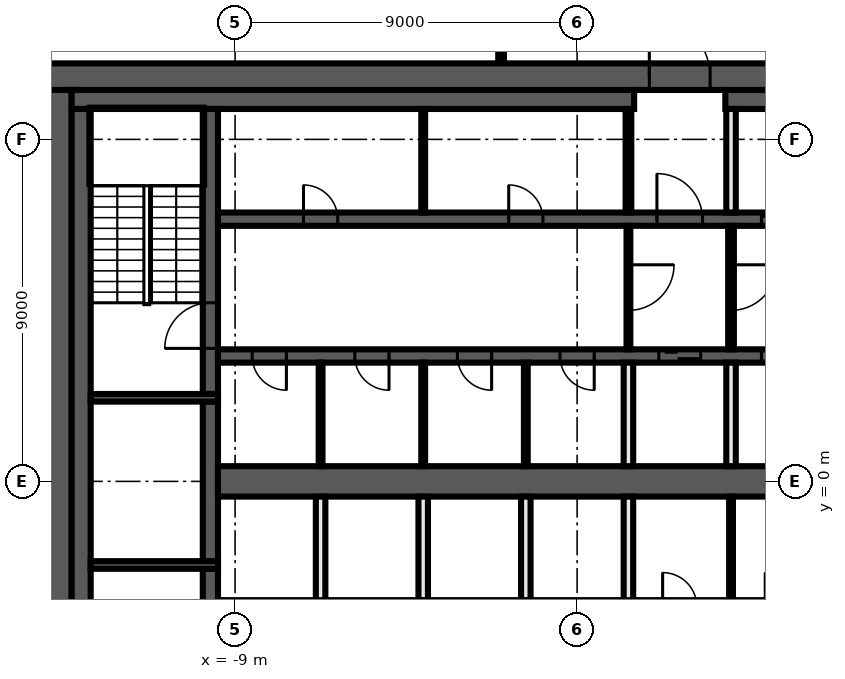
"""IFC4 building model, lengths in metres.
Left out: names, types, materials, properties, quantities, classifications, styles, units other than length and angle.
Written with IfcOpenShell. Run it as: python <this file> out.ifc"""

import sys

from ifc_helpers import new_model, si_unit, direction, frame, frame_2d, origin, place, context, subcontext, project, spatial, rectangle, extrude, element, fill, save


model = new_model("IFC4")
c1 = context("Model", 3, precision=1e-05, world=origin(), true_north=direction((0.0, 1.0)))
c2 = subcontext(c1, "Body", "Model", "MODEL_VIEW")
j1 = project(units=[si_unit("LENGTHUNIT", "METRE"), si_unit("PLANEANGLEUNIT", "RADIAN")], contexts=[c1])
p1 = place(None, origin())
s1 = spatial("IfcSite", under=j1, at=p1, CompositionType="ELEMENT")
p2 = place(p1, origin())
s2 = spatial("IfcBuilding", under=s1, at=p2, CompositionType="ELEMENT")
p3 = place(p2, frame((0.0, 0.0, 237.0)))
s3 = spatial("IfcBuildingStorey", under=s2, at=p3, CompositionType="ELEMENT", Elevation=237.0)
p4 = place(p3, frame((-2.0, 11.0, 0.0), z_axis=(0.0, 0.0, 1.0), x_axis=(0.0, 1.0, 0.0)))
e1 = element("IfcWall", 1, at=p4, inside=s3, PredefinedType="PARTITIONING", context=c2, shape_type="SweptSolid", body=[
    extrude(rectangle(XDim=2.325, YDim=0.15, at=frame_2d((1.163, 0.0))), origin(), (0.0, 0.0, 1.0), 3.82),
])
p5 = place(p3, frame((-14.0, 10.65, 0.0), z_axis=(0.0, 0.0, 1.0), x_axis=(1.0, 0.0, 0.0)))
e2 = element("IfcWall", 2, at=p5, inside=s3, PredefinedType="SHEAR", context=c2, shape_type="SweptSolid", body=[
    extrude(rectangle(XDim=28.0, YDim=0.7, at=frame_2d((14.0, 0.0))), origin(), (0.0, 0.0, 1.0), 3.82),
])
p6 = place(p5, frame((15.9, 0.0, 0.0)))
e3 = element("IfcOpeningElement", 3, at=p6, cuts=e2, PredefinedType="OPENING", context=c2, shape_type="SweptSolid", body=[
    extrude(rectangle(XDim=1.6, YDim=2.1, at=frame_2d((0.8, 1.05))), frame((0.0, 0.36, 0.0), z_axis=(0.0, -1.0, 0.0), x_axis=(1.0, 0.0, 0.0)), (0.0, 0.0, 1.0), 0.72),
])
p7 = place(p3, frame((-13.65, -10.3, 0.0), z_axis=(0.0, 0.0, 1.0), x_axis=(0.0, 1.0, 0.0)))
e4 = element("IfcWall", 4, at=p7, inside=s3, PredefinedType="SHEAR", context=c2, shape_type="SweptSolid", body=[
    extrude(rectangle(XDim=20.6, YDim=0.7, at=frame_2d((10.3, 0.0))), origin(), (0.0, 0.0, 1.0), 3.82),
])
p8 = place(p3, frame((-13.3, 10.05, 0.0), z_axis=(0.0, 0.0, 1.0), x_axis=(1.0, 0.0, 0.0)))
e5 = element("IfcWall", 5, at=p8, inside=s3, PredefinedType="SHEAR", context=c2, shape_type="SweptSolid", body=[
    extrude(rectangle(XDim=14.8, YDim=0.5, at=frame_2d((7.4, 0.0))), origin(), (0.0, 0.0, 1.0), 3.82),
])
p9 = place(p3, frame((3.9, 10.05, 0.0), z_axis=(0.0, 0.0, 1.0), x_axis=(1.0, 0.0, 0.0)))
e6 = element("IfcWall", 6, at=p9, inside=s3, PredefinedType="SHEAR", context=c2, shape_type="SweptSolid", body=[
    extrude(rectangle(XDim=9.4, YDim=0.5, at=frame_2d((4.7, 0.0))), origin(), (0.0, 0.0, 1.0), 3.82),
])
p10 = place(p3, frame((-13.05, -9.8, 0.0), z_axis=(0.0, 0.0, 1.0), x_axis=(0.0, 1.0, 0.0)))
e7 = element("IfcWall", 7, at=p10, inside=s3, PredefinedType="SHEAR", context=c2, shape_type="SweptSolid", body=[
    extrude(rectangle(XDim=19.6, YDim=0.5, at=frame_2d((9.8, 0.0))), origin(), (0.0, 0.0, 1.0), 3.82),
])
p11 = place(p3, frame((-9.65, -9.8, 0.0), z_axis=(0.0, 0.0, 1.0), x_axis=(0.0, 1.0, 0.0)))
e8 = element("IfcWall", 8, at=p11, inside=s3, PredefinedType="SHEAR", context=c2, shape_type="SweptSolid", body=[
    extrude(rectangle(XDim=7.5, YDim=0.4, at=frame_2d((3.75, 0.0))), origin(), (0.0, 0.0, 1.0), 3.82),
])
p12 = place(p11, frame((5.1, 0.0, 0.0)))
e9 = element("IfcOpeningElement", 9, at=p12, cuts=e8, PredefinedType="OPENING", context=c2, shape_type="SweptSolid", body=[
    extrude(rectangle(XDim=1.2, YDim=2.1, at=frame_2d((0.6, 1.05))), frame((0.0, 0.21, 0.0), z_axis=(0.0, -1.0, 0.0), x_axis=(1.0, 0.0, 0.0)), (0.0, 0.0, 1.0), 0.42),
])
p13 = place(p3, frame((-9.65, -2.1, 0.0), z_axis=(0.0, 0.0, 1.0), x_axis=(0.0, 1.0, 0.0)))
e10 = element("IfcWall", 10, at=p13, inside=s3, PredefinedType="SHEAR", context=c2, shape_type="SweptSolid", body=[
    extrude(rectangle(XDim=4.2, YDim=0.4, at=frame_2d((2.1, 0.0))), origin(), (0.0, 0.0, 1.0), 3.82),
])
p14 = place(p3, frame((-9.65, 2.3, 0.0), z_axis=(0.0, 0.0, 1.0), x_axis=(0.0, 1.0, 0.0)))
e11 = element("IfcWall", 11, at=p14, inside=s3, PredefinedType="SHEAR", context=c2, shape_type="SweptSolid", body=[
    extrude(rectangle(XDim=7.5, YDim=0.4, at=frame_2d((3.75, 0.0))), origin(), (0.0, 0.0, 1.0), 3.82),
])
p15 = place(p14, frame((1.2, 0.0, 0.0)))
e12 = element("IfcOpeningElement", 12, at=p15, cuts=e11, PredefinedType="OPENING", context=c2, shape_type="SweptSolid", body=[
    extrude(rectangle(XDim=1.2, YDim=2.1, at=frame_2d((0.6, 1.05))), frame((0.0, 0.21, 0.0), z_axis=(0.0, -1.0, 0.0), x_axis=(1.0, 0.0, 0.0)), (0.0, 0.0, 1.0), 0.42),
])
for number, where, z_axis, x_axis in (
    (13, (-9.45, 2.2, 0.0), (0.0, 0.0, 1.0), (-1.0, 0.0, 0.0)),
    (14, (-9.45, -2.2, 0.0), (0.0, 0.0, 1.0), (-1.0, 0.0, 0.0)),
):
    element("IfcWall", number, at=place(p3, frame(where, z_axis=z_axis, x_axis=x_axis)), inside=s3, PredefinedType="SHEAR", context=c2, shape_type="SweptSolid", body=[
        extrude(rectangle(XDim=3.35, YDim=0.2, at=frame_2d((1.675, 0.0))), origin(), (0.0, 0.0, 1.0), 3.82),
    ])
p16 = place(p3, frame((-9.45, 6.9, 0.0), z_axis=(0.0, 0.0, 1.0), x_axis=(1.0, 0.0, 0.0)))
e15 = element("IfcWall", 15, at=p16, inside=s3, PredefinedType="SHEAR", context=c2, shape_type="SweptSolid", body=[
    extrude(rectangle(XDim=18.9, YDim=0.35, at=frame_2d((9.45, 0.0))), origin(), (0.0, 0.0, 1.0), 3.82),
])
p17 = place(p16, frame((11.55, 0.0, 0.0)))
e16 = element("IfcOpeningElement", 16, at=p17, cuts=e15, PredefinedType="OPENING", context=c2, shape_type="SweptSolid", body=[
    extrude(rectangle(XDim=1.2, YDim=2.1, at=frame_2d((0.6, 1.05))), frame((0.0, 0.185, 0.0), z_axis=(0.0, -1.0, 0.0), x_axis=(1.0, 0.0, 0.0)), (0.0, 0.0, 1.0), 0.37),
])
p18 = place(p16, frame((14.3, 0.0, 0.0)))
e17 = element("IfcOpeningElement", 17, at=p18, cuts=e15, PredefinedType="OPENING", context=c2, shape_type="SweptSolid", body=[
    extrude(rectangle(XDim=1.1, YDim=2.1, at=frame_2d((0.55, 1.05))), frame((0.0, 0.185, 0.0), z_axis=(0.0, -1.0, 0.0), x_axis=(1.0, 0.0, 0.0)), (0.0, 0.0, 1.0), 0.37),
])
p19 = place(p16, frame((17.0, 0.0, 0.0)))
e18 = element("IfcOpeningElement", 18, at=p19, cuts=e15, PredefinedType="OPENING", context=c2, shape_type="SweptSolid", body=[
    extrude(rectangle(XDim=1.1, YDim=2.1, at=frame_2d((0.55, 1.05))), frame((0.0, 0.185, 0.0), z_axis=(0.0, -1.0, 0.0), x_axis=(1.0, 0.0, 0.0)), (0.0, 0.0, 1.0), 0.37),
])
p20 = place(p16, frame((2.25, 0.0, 0.0)))
e19 = element("IfcOpeningElement", 19, at=p20, cuts=e15, PredefinedType="OPENING", context=c2, shape_type="SweptSolid", body=[
    extrude(rectangle(XDim=0.9, YDim=2.1, at=frame_2d((0.45, 1.05))), frame((0.0, 0.185, 0.0), z_axis=(0.0, -1.0, 0.0), x_axis=(1.0, 0.0, 0.0)), (0.0, 0.0, 1.0), 0.37),
])
p21 = place(p16, frame((7.65, 0.0, 0.0)))
e20 = element("IfcOpeningElement", 20, at=p21, cuts=e15, PredefinedType="OPENING", context=c2, shape_type="SweptSolid", body=[
    extrude(rectangle(XDim=0.9, YDim=2.1, at=frame_2d((0.45, 1.05))), frame((0.0, 0.185, 0.0), z_axis=(0.0, -1.0, 0.0), x_axis=(1.0, 0.0, 0.0)), (0.0, 0.0, 1.0), 0.37),
])
p22 = place(p3, frame((9.45, 3.3, 0.0), z_axis=(0.0, 0.0, 1.0), x_axis=(-1.0, 0.0, 0.0)))
e21 = element("IfcWall", 21, at=p22, inside=s3, PredefinedType="SHEAR", context=c2, shape_type="SweptSolid", body=[
    extrude(rectangle(XDim=18.9, YDim=0.35, at=frame_2d((9.45, 0.0))), origin(), (0.0, 0.0, 1.0), 3.82),
])
p23 = place(p22, frame((6.2, 0.0, 0.0)))
e22 = element("IfcOpeningElement", 22, at=p23, cuts=e21, PredefinedType="OPENING", context=c2, shape_type="SweptSolid", body=[
    extrude(rectangle(XDim=1.1, YDim=2.1, at=frame_2d((0.55, 1.05))), frame((0.0, 0.185, 0.0), z_axis=(0.0, -1.0, 0.0), x_axis=(1.0, 0.0, 0.0)), (0.0, 0.0, 1.0), 0.37),
])
p24 = place(p22, frame((3.5, 0.0, 0.0)))
e23 = element("IfcOpeningElement", 23, at=p24, cuts=e21, PredefinedType="OPENING", context=c2, shape_type="SweptSolid", body=[
    extrude(rectangle(XDim=1.1, YDim=2.1, at=frame_2d((0.55, 1.05))), frame((0.0, 0.185, 0.0), z_axis=(0.0, -1.0, 0.0), x_axis=(1.0, 0.0, 0.0)), (0.0, 0.0, 1.0), 0.37),
])
p25 = place(p22, frame((0.9, 0.0, 0.0)))
e24 = element("IfcOpeningElement", 24, at=p25, cuts=e21, PredefinedType="OPENING", context=c2, shape_type="SweptSolid", body=[
    extrude(rectangle(XDim=0.9, YDim=2.1, at=frame_2d((0.45, 1.05))), frame((0.0, 0.185, 0.0), z_axis=(0.0, -1.0, 0.0), x_axis=(1.0, 0.0, 0.0)), (0.0, 0.0, 1.0), 0.37),
])
p26 = place(p22, frame((17.1, 0.0, 0.0)))
e25 = element("IfcOpeningElement", 25, at=p26, cuts=e21, PredefinedType="OPENING", context=c2, shape_type="SweptSolid", body=[
    extrude(rectangle(XDim=0.9, YDim=2.1, at=frame_2d((0.45, 1.05))), frame((0.0, 0.185, 0.0), z_axis=(0.0, -1.0, 0.0), x_axis=(1.0, 0.0, 0.0)), (0.0, 0.0, 1.0), 0.37),
])
p27 = place(p22, frame((14.4, 0.0, 0.0)))
e26 = element("IfcOpeningElement", 26, at=p27, cuts=e21, PredefinedType="OPENING", context=c2, shape_type="SweptSolid", body=[
    extrude(rectangle(XDim=0.9, YDim=2.1, at=frame_2d((0.45, 1.05))), frame((0.0, 0.185, 0.0), z_axis=(0.0, -1.0, 0.0), x_axis=(1.0, 0.0, 0.0)), (0.0, 0.0, 1.0), 0.37),
])
p28 = place(p22, frame((11.7, 0.0, 0.0)))
e27 = element("IfcOpeningElement", 27, at=p28, cuts=e21, PredefinedType="OPENING", context=c2, shape_type="SweptSolid", body=[
    extrude(rectangle(XDim=0.9, YDim=2.1, at=frame_2d((0.45, 1.05))), frame((0.0, 0.185, 0.0), z_axis=(0.0, -1.0, 0.0), x_axis=(1.0, 0.0, 0.0)), (0.0, 0.0, 1.0), 0.37),
])
p29 = place(p22, frame((9.0, 0.0, 0.0)))
e28 = element("IfcOpeningElement", 28, at=p29, cuts=e21, PredefinedType="OPENING", context=c2, shape_type="SweptSolid", body=[
    extrude(rectangle(XDim=0.9, YDim=2.1, at=frame_2d((0.45, 1.05))), frame((0.0, 0.185, 0.0), z_axis=(0.0, -1.0, 0.0), x_axis=(1.0, 0.0, 0.0)), (0.0, 0.0, 1.0), 0.37),
])
p30 = place(p3, frame((-9.45, 0.0, 0.0), z_axis=(0.0, 0.0, 1.0), x_axis=(1.0, 0.0, 0.0)))
e29 = element("IfcWall", 29, at=p30, inside=s3, PredefinedType="SHEAR", context=c2, shape_type="SweptSolid", body=[
    extrude(rectangle(XDim=18.9, YDim=0.8, at=frame_2d((9.45, 0.0))), origin(), (0.0, 0.0, 1.0), 3.82),
])
p31 = place(p3, frame((4.05, 6.725, 0.0), z_axis=(0.0, 0.0, 1.0), x_axis=(0.0, -1.0, 0.0)))
e30 = element("IfcWall", 30, at=p31, inside=s3, PredefinedType="PARTITIONING", context=c2, shape_type="SweptSolid", body=[
    extrude(rectangle(XDim=3.25, YDim=0.15, at=frame_2d((1.625, 0.0))), origin(), (0.0, 0.0, 1.0), 3.82),
])
p32 = place(p31, frame((1.025, 0.0, 0.0)))
e31 = element("IfcOpeningElement", 31, at=p32, cuts=e30, PredefinedType="OPENING", context=c2, shape_type="SweptSolid", body=[
    extrude(rectangle(XDim=1.2, YDim=2.1, at=frame_2d((0.6, 1.05))), frame((0.0, 0.085, 0.0), z_axis=(0.0, -1.0, 0.0), x_axis=(1.0, 0.0, 0.0)), (0.0, 0.0, 1.0), 0.17),
])
p33 = place(p3, frame((4.05, -3.125, 0.0), z_axis=(0.0, 0.0, 1.0), x_axis=(0.0, 1.0, 0.0)))
e32 = element("IfcWall", 32, at=p33, inside=s3, PredefinedType="PARTITIONING", context=c2, shape_type="SweptSolid", body=[
    extrude(rectangle(XDim=2.725, YDim=0.1, at=frame_2d((1.363, 0.0))), origin(), (0.0, 0.0, 1.0), 3.82),
])
for number, where, z_axis, x_axis in (
    (33, (4.05, 0.4, 0.0), (0.0, 0.0, 1.0), (0.0, 1.0, 0.0)),
    (34, (4.05, 7.075, 0.0), (0.0, 0.0, 1.0), (0.0, 1.0, 0.0)),
):
    element("IfcWall", number, at=place(p3, frame(where, z_axis=z_axis, x_axis=x_axis)), inside=s3, PredefinedType="SOLIDWALL", context=c2, shape_type="SweptSolid", body=[
        extrude(rectangle(XDim=2.725, YDim=0.25, at=frame_2d((1.363, 0.0))), origin(), (0.0, 0.0, 1.0), 3.82),
    ])
p34 = place(p3, frame((1.35, 7.075, 0.0), z_axis=(0.0, 0.0, 1.0), x_axis=(0.0, 1.0, 0.0)))
e35 = element("IfcWall", 35, at=p34, inside=s3, PredefinedType="PARTITIONING", context=c2, shape_type="SweptSolid", body=[
    extrude(rectangle(XDim=2.725, YDim=0.15, at=frame_2d((1.363, 0.0))), origin(), (0.0, 0.0, 1.0), 3.82),
])
p35 = place(p3, frame((1.35, 6.725, 0.0), z_axis=(0.0, 0.0, 1.0), x_axis=(0.0, -1.0, 0.0)))
e36 = element("IfcWall", 36, at=p35, inside=s3, PredefinedType="PARTITIONING", context=c2, shape_type="SweptSolid", body=[
    extrude(rectangle(XDim=3.25, YDim=0.1, at=frame_2d((1.625, 0.0))), origin(), (0.0, 0.0, 1.0), 3.82),
])
p36 = place(p35, frame((1.025, 0.0, 0.0)))
e37 = element("IfcOpeningElement", 37, at=p36, cuts=e36, PredefinedType="OPENING", context=c2, shape_type="SweptSolid", body=[
    extrude(rectangle(XDim=1.2, YDim=2.1, at=frame_2d((0.6, 1.05))), frame((0.0, 0.06, 0.0), z_axis=(0.0, -1.0, 0.0), x_axis=(1.0, 0.0, 0.0)), (0.0, 0.0, 1.0), 0.12),
])
for number, where, z_axis, x_axis in (
    (38, (1.35, -3.125, 0.0), (0.0, 0.0, 1.0), (0.0, 1.0, 0.0)),
    (39, (1.35, 0.4, 0.0), (0.0, 0.0, 1.0), (0.0, 1.0, 0.0)),
):
    element("IfcWall", number, at=place(p3, frame(where, z_axis=z_axis, x_axis=x_axis)), inside=s3, PredefinedType="SOLIDWALL", context=c2, shape_type="SweptSolid", body=[
        extrude(rectangle(XDim=2.725, YDim=0.25, at=frame_2d((1.363, 0.0))), origin(), (0.0, 0.0, 1.0), 3.82),
    ])
p37 = place(p3, frame((-1.35, 0.4, 0.0), z_axis=(0.0, 0.0, 1.0), x_axis=(0.0, 1.0, 0.0)))
e40 = element("IfcWall", 40, at=p37, inside=s3, PredefinedType="PARTITIONING", context=c2, shape_type="SweptSolid", body=[
    extrude(rectangle(XDim=2.725, YDim=0.1, at=frame_2d((1.363, 0.0))), origin(), (0.0, 0.0, 1.0), 3.82),
])
p38 = place(p3, frame((-1.35, -3.125, 0.0), z_axis=(0.0, 0.0, 1.0), x_axis=(0.0, 1.0, 0.0)))
e41 = element("IfcWall", 41, at=p38, inside=s3, PredefinedType="SOLIDWALL", context=c2, shape_type="SweptSolid", body=[
    extrude(rectangle(XDim=2.725, YDim=0.25, at=frame_2d((1.363, 0.0))), origin(), (0.0, 0.0, 1.0), 3.82),
])
for number, where, z_axis, x_axis in (
    (42, (-4.05, 0.4, 0.0), (0.0, 0.0, 1.0), (0.0, 1.0, 0.0)),
    (43, (-4.05, 7.075, 0.0), (0.0, 0.0, 1.0), (0.0, 1.0, 0.0)),
):
    element("IfcWall", number, at=place(p3, frame(where, z_axis=z_axis, x_axis=x_axis)), inside=s3, PredefinedType="PARTITIONING", context=c2, shape_type="SweptSolid", body=[
        extrude(rectangle(XDim=2.725, YDim=0.1, at=frame_2d((1.363, 0.0))), origin(), (0.0, 0.0, 1.0), 3.82),
    ])
p39 = place(p3, frame((-4.05, -3.125, 0.0), z_axis=(0.0, 0.0, 1.0), x_axis=(0.0, 1.0, 0.0)))
e44 = element("IfcWall", 44, at=p39, inside=s3, PredefinedType="SOLIDWALL", context=c2, shape_type="SweptSolid", body=[
    extrude(rectangle(XDim=2.725, YDim=0.25, at=frame_2d((1.363, 0.0))), origin(), (0.0, 0.0, 1.0), 3.82),
])
p40 = place(p3, frame((-6.75, 0.4, 0.0), z_axis=(0.0, 0.0, 1.0), x_axis=(0.0, 1.0, 0.0)))
e45 = element("IfcWall", 45, at=p40, inside=s3, PredefinedType="PARTITIONING", context=c2, shape_type="SweptSolid", body=[
    extrude(rectangle(XDim=2.725, YDim=0.1, at=frame_2d((1.363, 0.0))), origin(), (0.0, 0.0, 1.0), 3.82),
])
p41 = place(p3, frame((-6.75, -3.125, 0.0), z_axis=(0.0, 0.0, 1.0), x_axis=(0.0, 1.0, 0.0)))
e46 = element("IfcWall", 46, at=p41, inside=s3, PredefinedType="SOLIDWALL", context=c2, shape_type="SweptSolid", body=[
    extrude(rectangle(XDim=2.725, YDim=0.25, at=frame_2d((1.363, 0.0))), origin(), (0.0, 0.0, 1.0), 3.82),
])
p42 = place(p6, origin())
e47 = element("IfcDoor", 47, at=p42, inside=s3, OperationType="DOUBLE_DOOR_SINGLE_SWING", PredefinedType="DOOR", context=c2, shape_type="SweptSolid", body=[
    extrude(rectangle(XDim=1.6, YDim=2.1, at=frame_2d((0.8, 1.05))), frame((0.0, 0.025, 0.0), z_axis=(0.0, -1.0, 0.0), x_axis=(1.0, 0.0, 0.0)), (0.0, 0.0, 1.0), 0.05),
])
fill(e3, e47)
p43 = place(p17, origin())
e48 = element("IfcDoor", 48, at=p43, inside=s3, OperationType="SINGLE_SWING_LEFT", PredefinedType="DOOR", context=c2, shape_type="SweptSolid", body=[
    extrude(rectangle(XDim=1.2, YDim=2.1, at=frame_2d((0.6, 1.05))), frame((0.0, 0.025, 0.0), z_axis=(0.0, -1.0, 0.0), x_axis=(1.0, 0.0, 0.0)), (0.0, 0.0, 1.0), 0.05),
])
fill(e16, e48)
p44 = place(p18, origin())
e49 = element("IfcDoor", 49, at=p44, inside=s3, OperationType="DOUBLE_DOOR_SLIDING", PredefinedType="DOOR", context=c2, shape_type="SweptSolid", body=[
    extrude(rectangle(XDim=1.1, YDim=2.1, at=frame_2d((0.55, 1.05))), frame((0.0, 0.025, 0.0), z_axis=(0.0, -1.0, 0.0), x_axis=(1.0, 0.0, 0.0)), (0.0, 0.0, 1.0), 0.05),
])
fill(e17, e49)
p45 = place(p23, origin())
e50 = element("IfcDoor", 50, at=p45, inside=s3, OperationType="DOUBLE_DOOR_SLIDING", PredefinedType="DOOR", context=c2, shape_type="SweptSolid", body=[
    extrude(rectangle(XDim=1.1, YDim=2.1, at=frame_2d((0.55, 1.05))), frame((0.0, 0.025, 0.0), z_axis=(0.0, -1.0, 0.0), x_axis=(1.0, 0.0, 0.0)), (0.0, 0.0, 1.0), 0.05),
])
fill(e22, e50)
p46 = place(p24, origin())
e51 = element("IfcDoor", 51, at=p46, inside=s3, OperationType="DOUBLE_DOOR_SLIDING", PredefinedType="DOOR", context=c2, shape_type="SweptSolid", body=[
    extrude(rectangle(XDim=1.1, YDim=2.1, at=frame_2d((0.55, 1.05))), frame((0.0, 0.025, 0.0), z_axis=(0.0, -1.0, 0.0), x_axis=(1.0, 0.0, 0.0)), (0.0, 0.0, 1.0), 0.05),
])
fill(e23, e51)
p47 = place(p20, origin())
e52 = element("IfcDoor", 52, at=p47, inside=s3, OperationType="SINGLE_SWING_RIGHT", PredefinedType="DOOR", context=c2, shape_type="SweptSolid", body=[
    extrude(rectangle(XDim=0.9, YDim=2.1, at=frame_2d((0.45, 1.05))), frame((0.0, 0.025, 0.0), z_axis=(0.0, -1.0, 0.0), x_axis=(1.0, 0.0, 0.0)), (0.0, 0.0, 1.0), 0.05),
])
fill(e19, e52)
p48 = place(p21, origin())
e53 = element("IfcDoor", 53, at=p48, inside=s3, OperationType="SINGLE_SWING_LEFT", PredefinedType="DOOR", context=c2, shape_type="SweptSolid", body=[
    extrude(rectangle(XDim=0.9, YDim=2.1, at=frame_2d((0.45, 1.05))), frame((0.0, 0.025, 0.0), z_axis=(0.0, -1.0, 0.0), x_axis=(1.0, 0.0, 0.0)), (0.0, 0.0, 1.0), 0.05),
])
fill(e20, e53)
p49 = place(p26, origin())
e54 = element("IfcDoor", 54, at=p49, inside=s3, OperationType="SINGLE_SWING_RIGHT", PredefinedType="DOOR", context=c2, shape_type="SweptSolid", body=[
    extrude(rectangle(XDim=0.9, YDim=2.1, at=frame_2d((0.45, 1.05))), frame((0.0, 0.025, 0.0), z_axis=(0.0, -1.0, 0.0), x_axis=(1.0, 0.0, 0.0)), (0.0, 0.0, 1.0), 0.05),
])
fill(e25, e54)
p50 = place(p27, origin())
e55 = element("IfcDoor", 55, at=p50, inside=s3, OperationType="SINGLE_SWING_LEFT", PredefinedType="DOOR", context=c2, shape_type="SweptSolid", body=[
    extrude(rectangle(XDim=0.9, YDim=2.1, at=frame_2d((0.45, 1.05))), frame((0.0, 0.025, 0.0), z_axis=(0.0, -1.0, 0.0), x_axis=(1.0, 0.0, 0.0)), (0.0, 0.0, 1.0), 0.05),
])
fill(e26, e55)
p51 = place(p28, origin())
e56 = element("IfcDoor", 56, at=p51, inside=s3, OperationType="SINGLE_SWING_RIGHT", PredefinedType="DOOR", context=c2, shape_type="SweptSolid", body=[
    extrude(rectangle(XDim=0.9, YDim=2.1, at=frame_2d((0.45, 1.05))), frame((0.0, 0.025, 0.0), z_axis=(0.0, -1.0, 0.0), x_axis=(1.0, 0.0, 0.0)), (0.0, 0.0, 1.0), 0.05),
])
fill(e27, e56)
p52 = place(p29, origin())
e57 = element("IfcDoor", 57, at=p52, inside=s3, OperationType="SINGLE_SWING_LEFT", PredefinedType="DOOR", context=c2, shape_type="SweptSolid", body=[
    extrude(rectangle(XDim=0.9, YDim=2.1, at=frame_2d((0.45, 1.05))), frame((0.0, 0.025, 0.0), z_axis=(0.0, -1.0, 0.0), x_axis=(1.0, 0.0, 0.0)), (0.0, 0.0, 1.0), 0.05),
])
fill(e28, e57)
p53 = place(p15, origin())
e58 = element("IfcDoor", 58, at=p53, inside=s3, OperationType="SINGLE_SWING_RIGHT", PredefinedType="DOOR", context=c2, shape_type="SweptSolid", body=[
    extrude(rectangle(XDim=1.2, YDim=2.1, at=frame_2d((0.6, 1.05))), frame((0.0, 0.025, 0.0), z_axis=(0.0, -1.0, 0.0), x_axis=(1.0, 0.0, 0.0)), (0.0, 0.0, 1.0), 0.05),
])
fill(e12, e58)
p54 = place(p36, origin())
e59 = element("IfcDoor", 59, at=p54, inside=s3, OperationType="SINGLE_SWING_LEFT", PredefinedType="DOOR", context=c2, shape_type="SweptSolid", body=[
    extrude(rectangle(XDim=1.2, YDim=2.1, at=frame_2d((0.6, 1.05))), frame((0.0, 0.025, 0.0), z_axis=(0.0, -1.0, 0.0), x_axis=(1.0, 0.0, 0.0)), (0.0, 0.0, 1.0), 0.05),
])
fill(e37, e59)
p55 = place(p32, origin())
e60 = element("IfcDoor", 60, at=p55, inside=s3, OperationType="SINGLE_SWING_RIGHT", PredefinedType="DOOR", context=c2, shape_type="SweptSolid", body=[
    extrude(rectangle(XDim=1.2, YDim=2.1, at=frame_2d((0.6, 1.05))), frame((0.0, 0.025, 0.0), z_axis=(0.0, -1.0, 0.0), x_axis=(1.0, 0.0, 0.0)), (0.0, 0.0, 1.0), 0.05),
])
fill(e31, e60)
save(model, sys.argv[1])
